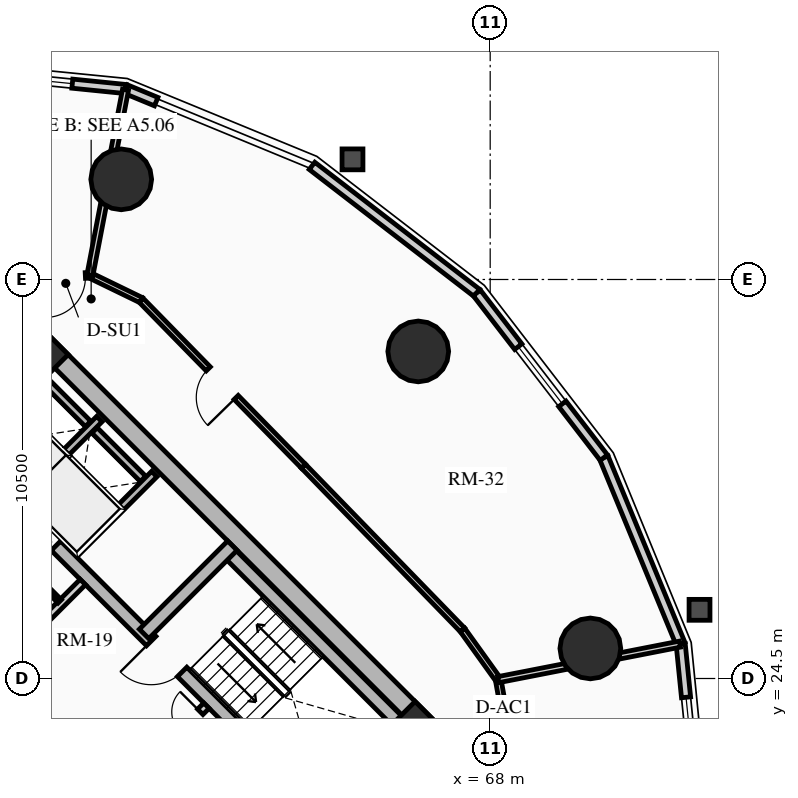
"""IFC4 building model, lengths in metres.
Left out: names, types, materials, properties, quantities, classifications, styles, units other than length and angle.
Written with IfcOpenShell. Run it as: python <this file> out.ifc"""

import sys

from ifc_helpers import new_model, si_unit, direction, frame, frame_2d, origin, origin_2d, place, context, subcontext, project, spatial, rectangle, circle, extrude, source, transform, mapped, element, fill, save


model = new_model("IFC4")
c1 = context("Model", 3, precision=1e-05, world=origin(), true_north=direction((0.0, 1.0)))
c2 = subcontext(c1, "Body", "Model", "MODEL_VIEW")
j1 = project(units=[si_unit("LENGTHUNIT", "METRE"), si_unit("PLANEANGLEUNIT", "RADIAN")], contexts=[c1])
p1 = place(None, origin())
s1 = spatial("IfcSite", under=j1, at=p1, CompositionType="ELEMENT")
p2 = place(p1, origin())
s2 = spatial("IfcBuilding", under=s1, at=p2, CompositionType="ELEMENT")
p3 = place(p2, frame((0.0, 0.0, 27.82)))
s3 = spatial("IfcBuildingStorey", under=s2, at=p3, CompositionType="ELEMENT", Elevation=27.82)
for number, where, z_axis, x_axis in (
    (1, (58.773, 15.661, 0.0), (0.0, 0.0, 1.0), (-0.707, 0.707, 0.0)),
    (2, (66.339, 23.227, 0.0), (0.0, 0.0, 1.0), (-0.707, 0.707, 0.0)),
):
    element("IfcWall", number, at=place(p3, frame(where, z_axis=z_axis, x_axis=x_axis)), inside=s3, PredefinedType="SHEAR", context=c2, shape_type="SweptSolid", body=[
        extrude(rectangle(XDim=14.3, YDim=0.5, at=frame_2d((7.15, 0.0))), origin(), (0.0, 0.0, 1.0), 2.91),
    ])
p4 = place(p3, frame((58.596, 15.838, 0.0), z_axis=(0.0, 0.0, 1.0), x_axis=(0.707106781187, 0.707106781187, 0.0)))
e3 = element("IfcWall", 3, at=p4, inside=s3, PredefinedType="SHEAR", context=c2, shape_type="SweptSolid", body=[
    extrude(rectangle(XDim=10.7, YDim=0.5, at=frame_2d((5.35, 0.0))), origin(), (0.0, 0.0, 1.0), 2.91),
])
m1 = source(origin(), c2, "Body", "SweptSolid", [
    extrude(rectangle(XDim=1.5, YDim=2.02, at=frame_2d((0.75, 1.01))), frame((0.0, 0.26, 0.0), z_axis=(0.0, -1.0, 0.0), x_axis=(1.0, 0.0, 0.0)), (0.0, 0.0, 1.0), 0.52),
])
p5 = place(p4, frame((5.45, 0.0, 0.0)))
e4 = element("IfcOpeningElement", 4, at=p5, cuts=e3, PredefinedType="OPENING", context=c2, shape_type="MappedRepresentation", body=[
    mapped(m1, transform((0.0, 0.0, 0.0), x_axis=(1.0, 0.0, 0.0), y_axis=(0.0, 1.0, 0.0), z_axis=(0.0, 0.0, 1.0), scale=1.0)),
])
p6 = place(p3, frame((48.838, 25.596, 0.0), z_axis=(0.0, 0.0, 1.0), x_axis=(0.707106781187, 0.707106781187, 0.0)))
e5 = element("IfcWall", 5, at=p6, inside=s3, PredefinedType="SHEAR", context=c2, shape_type="SweptSolid", body=[
    extrude(rectangle(XDim=10.7, YDim=0.5, at=frame_2d((5.35, 0.0))), origin(), (0.0, 0.0, 1.0), 2.91),
])
p7 = place(p6, frame((4.6, 0.0, 0.0)))
e6 = element("IfcOpeningElement", 6, at=p7, cuts=e5, PredefinedType="OPENING", context=c2, shape_type="MappedRepresentation", body=[
    mapped(m1, transform((0.0, 0.0, 0.0), x_axis=(1.0, 0.0, 0.0), y_axis=(0.0, 1.0, 0.0), z_axis=(0.0, 0.0, 1.0), scale=1.0)),
])
p8 = place(p3, frame((61.096, 18.338, 0.0), z_axis=(0.0, 0.0, 1.0), x_axis=(-0.707106781187, 0.707106781187, 0.0)))
e7 = element("IfcWall", 7, at=p8, inside=s3, PredefinedType="SHEAR", context=c2, shape_type="SweptSolid", body=[
    extrude(rectangle(XDim=13.8, YDim=0.35, at=frame_2d((6.9, 0.0))), origin(), (0.0, 0.0, 1.0), 2.91),
])
m2 = source(origin(), c2, "Body", "SweptSolid", [
    extrude(rectangle(XDim=1.1, YDim=2.015, at=frame_2d((0.55, 1.007))), frame((0.0, 0.185, 0.0), z_axis=(0.0, -1.0, 0.0), x_axis=(1.0, 0.0, 0.0)), (0.0, 0.0, 1.0), 0.37),
])
p9 = place(p8, frame((4.9, 0.0, 0.0)))
e8 = element("IfcOpeningElement", 8, at=p9, cuts=e7, PredefinedType="OPENING", context=c2, shape_type="MappedRepresentation", body=[
    mapped(m2, transform((0.0, 0.0, 0.0), x_axis=(1.0, 0.0, 0.0), y_axis=(0.0, 1.0, 0.0), z_axis=(0.0, 0.0, 1.0), scale=1.0)),
])
m3 = source(origin(), c2, "Body", "SweptSolid", [
    extrude(rectangle(XDim=1.15, YDim=2.02, at=frame_2d((0.575, 1.01))), frame((0.0, 0.185, 0.0), z_axis=(0.0, -1.0, 0.0), x_axis=(1.0, 0.0, 0.0)), (0.0, 0.0, 1.0), 0.37),
])
p10 = place(p8, frame((7.32, 0.0, 0.0)))
e9 = element("IfcOpeningElement", 9, at=p10, cuts=e7, PredefinedType="OPENING", context=c2, shape_type="MappedRepresentation", body=[
    mapped(m3, transform((0.0, 0.0, 0.0), x_axis=(1.0, 0.0, 0.0), y_axis=(0.0, 1.0, 0.0), z_axis=(0.0, 0.0, 1.0), scale=1.0)),
])
p11 = place(p3, frame((63.662, 20.904, 0.0), z_axis=(0.0, 0.0, 1.0), x_axis=(-0.707106781187, 0.707106781187, 0.0)))
e10 = element("IfcWall", 10, at=p11, inside=s3, PredefinedType="SHEAR", context=c2, shape_type="SweptSolid", body=[
    extrude(rectangle(XDim=13.8, YDim=0.35, at=frame_2d((6.9, 0.0))), origin(), (0.0, 0.0, 1.0), 2.91),
])
p12 = place(p11, frame((10.025, 0.0, 0.0)))
e11 = element("IfcOpeningElement", 11, at=p12, cuts=e10, PredefinedType="OPENING", context=c2, shape_type="MappedRepresentation", body=[
    mapped(m2, transform((0.0, 0.0, 0.0), x_axis=(1.0, 0.0, 0.0), y_axis=(0.0, 1.0, 0.0), z_axis=(0.0, 0.0, 1.0), scale=1.0)),
])
p13 = place(p11, frame((12.025, 0.0, 0.0)))
e12 = element("IfcOpeningElement", 12, at=p13, cuts=e10, PredefinedType="OPENING", context=c2, shape_type="MappedRepresentation", body=[
    mapped(m2, transform((0.0, 0.0, 0.0), x_axis=(1.0, 0.0, 0.0), y_axis=(0.0, 1.0, 0.0), z_axis=(0.0, 0.0, 1.0), scale=1.0)),
])
p14 = place(p11, frame((5.33, 0.0, 0.0)))
e13 = element("IfcOpeningElement", 13, at=p14, cuts=e10, PredefinedType="OPENING", context=c2, shape_type="MappedRepresentation", body=[
    mapped(m3, transform((0.0, 0.0, 0.0), x_axis=(1.0, 0.0, 0.0), y_axis=(0.0, 1.0, 0.0), z_axis=(0.0, 0.0, 1.0), scale=1.0)),
])
p15 = place(p3, frame((65.847, 23.089, 0.0), z_axis=(0.0, 0.0, 1.0), x_axis=(-0.707106781187, 0.707106781187, 0.0)))
e14 = element("IfcWall", 14, at=p15, inside=s3, PredefinedType="SHEAR", context=c2, shape_type="SweptSolid", body=[
    extrude(rectangle(XDim=6.745, YDim=0.35, at=frame_2d((3.373, 0.0))), origin(), (0.0, 0.0, 1.0), 2.91),
])
p16 = place(p3, frame((58.893, 25.674, 0.0), z_axis=(0.0, 0.0, 1.0), x_axis=(0.707106781187, 0.707106781187, 0.0)))
e15 = element("IfcWall", 15, at=p16, inside=s3, PredefinedType="SHEAR", context=c2, shape_type="SweptSolid", body=[
    extrude(rectangle(XDim=3.285, YDim=0.35, at=frame_2d((1.643, 0.0))), origin(), (0.0, 0.0, 1.0), 2.91),
])
for number, where, z_axis, x_axis in (
    (16, (66.024, 23.294, 0.0), (0.0, 0.0, 1.0), (0.707, 0.707, 0.0)),
    (17, (56.294, 33.024, 0.0), (0.0, 0.0, 1.0), (0.707, 0.707, 0.0)),
):
    element("IfcColumn", number, at=place(p3, frame(where, z_axis=z_axis, x_axis=x_axis)), inside=s3, PredefinedType="COLUMN", context=c2, shape_type="SweptSolid", body=[
        extrude(rectangle(XDim=0.85, YDim=0.85, at=origin_2d()), origin(), (0.0, 0.0, 1.0), 2.91),
    ])
for number, where, z_axis, x_axis in (
    (18, (66.107, 33.107, 0.0), (0.0, 0.0, 1.0), (1.0, 0.0, 0.0)),
    (19, (58.291, 37.635, 0.0), (0.0, 0.0, 1.0), (1.0, 0.0, 0.0)),
    (20, (70.635, 25.291, 0.0), (0.0, 0.0, 1.0), (1.0, 0.0, 0.0)),
):
    element("IfcColumn", number, at=place(p3, frame(where, z_axis=z_axis, x_axis=x_axis)), inside=s3, PredefinedType="USERDEFINED", context=c2, shape_type="SweptSolid", body=[
        extrude(circle(Radius=0.8, at=origin_2d()), origin(), (0.0, 0.0, 1.0), 2.91),
    ])
p17 = place(p3, frame((63.312, 37.99, 0.0), z_axis=(0.0, 0.0, 1.0), x_axis=(0.791972010801, -0.610557396243, 0.0)))
e21 = element("IfcWall", 21, at=p17, inside=s3, PredefinedType="SOLIDWALL", context=c2, shape_type="SweptSolid", body=[
    extrude(rectangle(XDim=5.475, YDim=0.24, at=frame_2d((2.737, 0.0))), origin(), (0.0, 0.0, 1.0), 2.073),
])
p18 = place(p3, frame((58.407, 40.012, 0.0), z_axis=(0.0, 0.0, 1.0), x_axis=(0.924556017656, -0.381046152345, 0.0)))
e22 = element("IfcWall", 22, at=p18, inside=s3, PredefinedType="SOLIDWALL", context=c2, shape_type="SweptSolid", body=[
    extrude(rectangle(XDim=0.87, YDim=0.24, at=frame_2d((0.435, 0.0))), origin(), (0.0, 0.0, 1.0), 2.635),
])
p19 = place(p3, frame((53.414, 40.516, 0.0), z_axis=(0.0, 0.0, 1.0), x_axis=(0.994951574538, -0.100356187272, 0.0)))
e23 = element("IfcWall", 23, at=p19, inside=s3, PredefinedType="SOLIDWALL", context=c2, shape_type="SweptSolid", body=[
    extrude(rectangle(XDim=5.019, YDim=0.24, at=frame_2d((2.509, 0.0))), origin(), (0.0, 0.0, 1.0), 2.635),
])
m4 = source(origin(), c2, "Body", "SweptSolid", [
    extrude(rectangle(XDim=2.2, YDim=1.35, at=frame_2d((1.1, 0.675))), frame((0.0, 0.13, 0.0), z_axis=(0.0, -1.0, 0.0), x_axis=(1.0, 0.0, 0.0)), (0.0, 0.0, 1.0), 0.26),
])
p20 = place(p19, frame((1.409, 0.0, 0.65)))
e24 = element("IfcOpeningElement", 24, at=p20, cuts=e23, PredefinedType="OPENING", context=c2, shape_type="MappedRepresentation", body=[
    mapped(m4, transform((0.0, 0.0, 0.0), x_axis=(1.0, 0.0, 0.0), y_axis=(0.0, 1.0, 0.0), z_axis=(0.0, 0.0, 1.0), scale=1.0)),
])
p21 = place(p3, frame((73.012, 25.407, 0.0), z_axis=(0.0, 0.0, 1.0), x_axis=(0.100356187272, -0.994951574538, 0.0)))
e25 = element("IfcWall", 25, at=p21, inside=s3, PredefinedType="SOLIDWALL", context=c2, shape_type="SweptSolid", body=[
    extrude(rectangle(XDim=5.019, YDim=0.24, at=frame_2d((2.509, 0.0))), origin(), (0.0, 0.0, 1.0), 2.635),
])
p22 = place(p21, frame((1.409, 0.0, 0.65)))
e26 = element("IfcOpeningElement", 26, at=p22, cuts=e25, PredefinedType="OPENING", context=c2, shape_type="MappedRepresentation", body=[
    mapped(m4, transform((0.0, 0.0, 0.0), x_axis=(1.0, 0.0, 0.0), y_axis=(0.0, 1.0, 0.0), z_axis=(0.0, 0.0, 1.0), scale=1.0)),
])
p23 = place(p3, frame((70.99, 30.312, 0.0), z_axis=(0.0, 0.0, 1.0), x_axis=(0.381113147118, -0.924528403616, 0.0)))
e27 = element("IfcWall", 27, at=p23, inside=s3, PredefinedType="SOLIDWALL", context=c2, shape_type="SweptSolid", body=[
    extrude(rectangle(XDim=5.305, YDim=0.24, at=frame_2d((2.653, 0.0))), origin(), (0.0, 0.0, 1.0), 2.635),
])
p24 = place(p3, frame((67.648, 34.648, 0.0), z_axis=(0.0, 0.0, 1.0), x_axis=(0.610557396243, -0.791972010801, 0.0)))
e28 = element("IfcWall", 28, at=p24, inside=s3, PredefinedType="SOLIDWALL", context=c2, shape_type="SweptSolid", body=[
    extrude(rectangle(XDim=5.475, YDim=0.24, at=frame_2d((2.737, 0.0))), origin(), (0.0, 0.0, 1.0), 2.073),
])
m5 = source(origin(), c2, "Body", "SweptSolid", [
    extrude(rectangle(XDim=1.9, YDim=1.35, at=frame_2d((0.95, 0.675))), frame((0.0, 0.13, 0.0), z_axis=(0.0, -1.0, 0.0), x_axis=(1.0, 0.0, 0.0)), (0.0, 0.0, 1.0), 0.26),
])
p25 = place(p24, frame((1.787, 0.0, 0.65)))
e29 = element("IfcOpeningElement", 29, at=p25, cuts=e28, PredefinedType="OPENING", context=c2, shape_type="MappedRepresentation", body=[
    mapped(m5, transform((0.0, 0.0, 0.0), x_axis=(1.0, 0.0, 0.0), y_axis=(0.0, 1.0, 0.0), z_axis=(0.0, 0.0, 1.0), scale=1.0)),
])
p26 = place(p3, frame((57.062, 27.781, 0.0), z_axis=(0.0, 0.0, 1.0), x_axis=(0.707106781187, 0.707106781187, 0.0)))
e30 = element("IfcWall", 30, at=p26, inside=s3, PredefinedType="SHEAR", context=c2, shape_type="SweptSolid", body=[
    extrude(rectangle(XDim=2.97, YDim=0.2, at=frame_2d((1.485, 0.0))), origin(), (0.0, 0.0, 1.0), 2.91),
])
p27 = place(p3, frame((55.615, 29.227, 0.0), z_axis=(0.0, 0.0, 1.0), x_axis=(0.707147878904, 0.70706568108, 0.0)))
e31 = element("IfcWall", 31, at=p27, inside=s3, PredefinedType="SHEAR", context=c2, shape_type="SweptSolid", body=[
    extrude(rectangle(XDim=2.97, YDim=0.2, at=frame_2d((1.485, 0.0))), origin(), (0.0, 0.0, 1.0), 2.91),
])
p28 = place(p3, frame((58.865, 29.754, 0.0), z_axis=(0.0, 0.0, 1.0), x_axis=(-0.707174411312, 0.707039144592, 0.0)))
e32 = element("IfcWall", 32, at=p28, inside=s3, PredefinedType="SHEAR", context=c2, shape_type="SweptSolid", body=[
    extrude(rectangle(XDim=1.805, YDim=0.2, at=frame_2d((0.902, 0.0))), origin(), (0.0, 0.0, 1.0), 2.91),
])
p29 = place(p3, frame((57.419, 31.2, 0.0), z_axis=(0.0, 0.0, 1.0), x_axis=(-0.707032117043, 0.707181437447, 0.0)))
e33 = element("IfcWall", 33, at=p29, inside=s3, PredefinedType="SHEAR", context=c2, shape_type="SweptSolid", body=[
    extrude(rectangle(XDim=1.635, YDim=0.2, at=frame_2d((0.817, 0.0))), origin(), (0.0, 0.0, 1.0), 2.91),
])
p30 = place(p3, frame((58.214, 21.467, 0.0), z_axis=(0.0, 0.0, 1.0), x_axis=(0.707106781187, 0.707106781187, 0.0)))
e34 = element("IfcWall", 34, at=p30, inside=s3, PredefinedType="PARTITIONING", context=c2, shape_type="SweptSolid", body=[
    extrude(rectangle(XDim=3.28, YDim=0.2, at=frame_2d((1.64, 0.0))), origin(), (0.0, 0.0, 1.0), 2.635),
])
m6 = source(origin(), c2, "Body", "SweptSolid", [
    extrude(rectangle(XDim=1.5, YDim=2.02, at=frame_2d((0.75, 1.01))), frame((0.0, 0.11, 0.0), z_axis=(0.0, -1.0, 0.0), x_axis=(1.0, 0.0, 0.0)), (0.0, 0.0, 1.0), 0.22),
])
p31 = place(p30, frame((1.55, 0.0, 0.0)))
e35 = element("IfcOpeningElement", 35, at=p31, cuts=e34, PredefinedType="OPENING", context=c2, shape_type="MappedRepresentation", body=[
    mapped(m6, transform((0.0, 0.0, 0.0), x_axis=(1.0, 0.0, 0.0), y_axis=(0.0, 1.0, 0.0), z_axis=(0.0, 0.0, 1.0), scale=1.0)),
])
p32 = place(p3, frame((54.961, 24.719, 0.0), z_axis=(0.0, 0.0, 1.0), x_axis=(0.707106781187, 0.707106781187, 0.0)))
e36 = element("IfcWall", 36, at=p32, inside=s3, PredefinedType="PARTITIONING", context=c2, shape_type="SweptSolid", body=[
    extrude(rectangle(XDim=3.28, YDim=0.2, at=frame_2d((1.64, 0.0))), origin(), (0.0, 0.0, 1.0), 2.635),
])
m7 = source(origin(), c2, "Body", "SweptSolid", [
    extrude(rectangle(XDim=0.9, YDim=2.005, at=frame_2d((0.45, 1.002))), frame((0.0, 0.11, 0.0), z_axis=(0.0, -1.0, 0.0), x_axis=(1.0, 0.0, 0.0)), (0.0, 0.0, 1.0), 0.22),
])
p33 = place(p32, frame((0.16, 0.0, 0.0)))
e37 = element("IfcOpeningElement", 37, at=p33, cuts=e36, PredefinedType="OPENING", context=c2, shape_type="MappedRepresentation", body=[
    mapped(m7, transform((0.0, 0.0, 0.0), x_axis=(1.0, 0.0, 0.0), y_axis=(0.0, 1.0, 0.0), z_axis=(0.0, 0.0, 1.0), scale=1.0)),
])
p34 = place(p3, frame((56.673, 26.529, 0.0), z_axis=(0.0, 0.0, 1.0), x_axis=(-0.707052764397, 0.70716079385, 0.0)))
e38 = element("IfcWall", 38, at=p34, inside=s3, PredefinedType="PARTITIONING", context=c2, shape_type="SweptSolid", body=[
    extrude(rectangle(XDim=2.26, YDim=0.125, at=frame_2d((1.13, 0.0))), origin(), (0.0, 0.0, 1.0), 2.635),
])
m8 = source(origin(), c2, "Body", "SweptSolid", [
    extrude(rectangle(XDim=0.9, YDim=2.005, at=frame_2d((0.45, 1.002))), frame((0.0, 0.073, 0.0), z_axis=(0.0, -1.0, 0.0), x_axis=(1.0, 0.0, 0.0)), (0.0, 0.0, 1.0), 0.145),
])
p35 = place(p34, frame((0.65, 0.0, 0.0)))
e39 = element("IfcOpeningElement", 39, at=p35, cuts=e38, PredefinedType="OPENING", context=c2, shape_type="MappedRepresentation", body=[
    mapped(m8, transform((0.0, 0.0, 0.0), x_axis=(1.0, 0.0, 0.0), y_axis=(0.0, 1.0, 0.0), z_axis=(0.0, 0.0, 1.0), scale=1.0)),
])
p36 = place(p3, frame((63.086, 30.086, 0.0), z_axis=(0.0, 0.0, 1.0), x_axis=(-0.699075897379, 0.715047473741, 0.0)))
e40 = element("IfcWall", 40, at=p36, inside=s3, PredefinedType="PARTITIONING", context=c2, shape_type="SweptSolid", body=[
    extrude(rectangle(XDim=6.114, YDim=0.15, at=frame_2d((3.057, 0.0))), origin(), (0.0, 0.0, 1.0), 2.159),
])
m9 = source(origin(), c2, "Body", "SweptSolid", [
    extrude(rectangle(XDim=1.05, YDim=2.015, at=frame_2d((0.525, 1.007))), frame((0.0, 0.085, 0.0), z_axis=(0.0, -1.0, 0.0), x_axis=(1.0, 0.0, 0.0)), (0.0, 0.0, 1.0), 0.17),
])
p37 = place(p36, frame((2.532, 0.0, 0.0)))
e41 = element("IfcOpeningElement", 41, at=p37, cuts=e40, PredefinedType="OPENING", context=c2, shape_type="MappedRepresentation", body=[
    mapped(m9, transform((0.0, 0.0, 0.0), x_axis=(1.0, 0.0, 0.0), y_axis=(0.0, 1.0, 0.0), z_axis=(0.0, 0.0, 1.0), scale=1.0)),
])
p38 = place(p3, frame((58.812, 34.458, 0.0), z_axis=(0.0, 0.0, 1.0), x_axis=(-0.899559490277, 0.436798264021, 0.0)))
e42 = element("IfcWall", 42, at=p38, inside=s3, PredefinedType="PARTITIONING", context=c2, shape_type="SweptSolid", body=[
    extrude(rectangle(XDim=1.495, YDim=0.15, at=frame_2d((0.748, 0.0))), origin(), (0.0, 0.0, 1.0), 2.205),
])
p39 = place(p3, frame((57.467, 35.111, 0.0), z_axis=(0.0, 0.0, 1.0), x_axis=(-0.998691757323, -0.051134859488, 0.0)))
e43 = element("IfcWall", 43, at=p39, inside=s3, PredefinedType="PARTITIONING", context=c2, shape_type="SweptSolid", body=[
    extrude(rectangle(XDim=1.485, YDim=0.15, at=frame_2d((0.742, 0.0))), origin(), (0.0, 0.0, 1.0), 2.159),
])
p40 = place(p39, frame((0.12, 0.0, 0.0)))
e44 = element("IfcOpeningElement", 44, at=p40, cuts=e43, PredefinedType="OPENING", context=c2, shape_type="MappedRepresentation", body=[
    mapped(m9, transform((0.0, 0.0, 0.0), x_axis=(1.0, 0.0, 0.0), y_axis=(0.0, 1.0, 0.0), z_axis=(0.0, 0.0, 1.0), scale=1.0)),
])
p41 = place(p3, frame((68.456, 23.11, 0.0), z_axis=(0.0, 0.0, 1.0), x_axis=(-0.1772522795, 0.984165448191, 0.0)))
e45 = element("IfcWall", 45, at=p41, inside=s3, PredefinedType="PARTITIONING", context=c2, shape_type="SweptSolid", body=[
    extrude(rectangle(XDim=1.382, YDim=0.15, at=frame_2d((0.691, 0.0))), origin(), (0.0, 0.0, 1.0), 2.159),
])
p42 = place(p3, frame((68.211, 24.469, 0.0), z_axis=(0.0, 0.0, 1.0), x_axis=(-0.583012141368, 0.812463441034, 0.0)))
e46 = element("IfcWall", 46, at=p42, inside=s3, PredefinedType="PARTITIONING", context=c2, shape_type="SweptSolid", body=[
    extrude(rectangle(XDim=1.613, YDim=0.15, at=frame_2d((0.807, 0.0))), origin(), (0.0, 0.0, 1.0), 2.205),
])
p43 = place(p3, frame((67.27, 25.78, 0.0), z_axis=(0.0, 0.0, 1.0), x_axis=(-0.696847842907, 0.717218992942, 0.0)))
e47 = element("IfcWall", 47, at=p43, inside=s3, PredefinedType="PARTITIONING", context=c2, shape_type="SweptSolid", body=[
    extrude(rectangle(XDim=6.004, YDim=0.15, at=frame_2d((3.002, 0.0))), origin(), (0.0, 0.0, 1.0), 2.635),
])
p44 = place(p3, frame((57.467, 35.111, 0.0), z_axis=(0.0, 0.0, 1.0), x_axis=(0.188572285328, 0.982059312468, 0.0)))
e48 = element("IfcWall", 48, at=p44, inside=s3, PredefinedType="PARTITIONING", context=c2, shape_type="SweptSolid", body=[
    extrude(rectangle(XDim=4.97, YDim=0.16, at=frame_2d((2.485, 0.0))), origin(), (0.0, 0.0, 1.0), 2.073),
])
p45 = place(p3, frame((68.211, 24.469, 0.0), z_axis=(0.0, 0.0, 1.0), x_axis=(0.981421381452, 0.19186472325, 0.0)))
e49 = element("IfcWall", 49, at=p45, inside=s3, PredefinedType="PARTITIONING", context=c2, shape_type="SweptSolid", body=[
    extrude(rectangle(XDim=4.872, YDim=0.16, at=frame_2d((2.436, 0.0))), origin(), (0.0, 0.0, 1.0), 2.073),
])
m10 = source(origin(), c2, "Body", "SweptSolid", [
    extrude(rectangle(XDim=2.2, YDim=1.35, at=frame_2d((1.1, 0.675))), frame((0.0, 0.03, 0.0), z_axis=(0.0, -1.0, 0.0), x_axis=(1.0, 0.0, 0.0)), (0.0, 0.0, 1.0), 0.06),
])
p46 = place(p20, origin())
e50 = element("IfcWindow", 50, at=p46, inside=s3, PartitioningType="DOUBLE_PANEL_VERTICAL", PredefinedType="WINDOW", context=c2, shape_type="MappedRepresentation", body=[
    mapped(m10, transform((0.0, 0.0, 0.0), x_axis=(1.0, 0.0, 0.0), y_axis=(0.0, 1.0, 0.0), z_axis=(0.0, 0.0, 1.0), scale=1.0)),
])
fill(e24, e50)
p47 = place(p22, origin())
e51 = element("IfcWindow", 51, at=p47, inside=s3, PartitioningType="DOUBLE_PANEL_VERTICAL", PredefinedType="WINDOW", context=c2, shape_type="MappedRepresentation", body=[
    mapped(m10, transform((0.0, 0.0, 0.0), x_axis=(1.0, 0.0, 0.0), y_axis=(0.0, 1.0, 0.0), z_axis=(0.0, 0.0, 1.0), scale=1.0)),
])
fill(e26, e51)
m11 = source(origin(), c2, "Body", "SweptSolid", [
    extrude(rectangle(XDim=1.9, YDim=1.35, at=frame_2d((0.95, 0.675))), frame((0.0, 0.03, 0.0), z_axis=(0.0, -1.0, 0.0), x_axis=(1.0, 0.0, 0.0)), (0.0, 0.0, 1.0), 0.06),
])
p48 = place(p25, origin())
e52 = element("IfcWindow", 52, at=p48, inside=s3, PartitioningType="DOUBLE_PANEL_VERTICAL", PredefinedType="WINDOW", context=c2, shape_type="MappedRepresentation", body=[
    mapped(m11, transform((0.0, 0.0, 0.0), x_axis=(1.0, 0.0, 0.0), y_axis=(0.0, 1.0, 0.0), z_axis=(0.0, 0.0, 1.0), scale=1.0)),
])
fill(e29, e52)
m12 = source(origin(), c2, "Body", "SweptSolid", [
    extrude(rectangle(XDim=1.1, YDim=2.015, at=frame_2d((0.55, 1.007))), frame((0.0, 0.025, 0.0), z_axis=(0.0, -1.0, 0.0), x_axis=(1.0, 0.0, 0.0)), (0.0, 0.0, 1.0), 0.05),
])
p49 = place(p12, origin())
e53 = element("IfcDoor", 53, at=p49, inside=s3, OperationType="SLIDING_TO_RIGHT", PredefinedType="DOOR", context=c2, shape_type="MappedRepresentation", body=[
    mapped(m12, transform((0.0, 0.0, 0.0), x_axis=(1.0, 0.0, 0.0), y_axis=(0.0, 1.0, 0.0), z_axis=(0.0, 0.0, 1.0), scale=1.0)),
])
fill(e11, e53)
m13 = source(origin(), c2, "Body", "SweptSolid", [
    extrude(rectangle(XDim=1.15, YDim=2.02, at=frame_2d((0.575, 1.01))), frame((0.0, 0.025, 0.0), z_axis=(0.0, -1.0, 0.0), x_axis=(1.0, 0.0, 0.0)), (0.0, 0.0, 1.0), 0.05),
])
p50 = place(p14, origin())
e54 = element("IfcDoor", 54, at=p50, inside=s3, OperationType="SINGLE_SWING_RIGHT", PredefinedType="DOOR", context=c2, shape_type="MappedRepresentation", body=[
    mapped(m13, transform((0.0, 0.0, 0.0), x_axis=(1.0, 0.0, 0.0), y_axis=(0.0, 1.0, 0.0), z_axis=(0.0, 0.0, 1.0), scale=1.0)),
])
fill(e13, e54)
m14 = source(origin(), c2, "Body", "SweptSolid", [
    extrude(rectangle(XDim=1.5, YDim=2.02, at=frame_2d((0.75, 1.01))), frame((0.0, 0.025, 0.0), z_axis=(0.0, -1.0, 0.0), x_axis=(1.0, 0.0, 0.0)), (0.0, 0.0, 1.0), 0.05),
])
p51 = place(p31, origin())
e55 = element("IfcDoor", 55, at=p51, inside=s3, OperationType="DOUBLE_DOOR_SINGLE_SWING", PredefinedType="DOOR", context=c2, shape_type="MappedRepresentation", body=[
    mapped(m14, transform((0.0, 0.0, 0.0), x_axis=(1.0, 0.0, 0.0), y_axis=(0.0, 1.0, 0.0), z_axis=(0.0, 0.0, 1.0), scale=1.0)),
])
fill(e35, e55)
m15 = source(origin(), c2, "Body", "SweptSolid", [
    extrude(rectangle(XDim=1.05, YDim=2.015, at=frame_2d((0.525, 1.007))), frame((0.0, 0.025, 0.0), z_axis=(0.0, -1.0, 0.0), x_axis=(1.0, 0.0, 0.0)), (0.0, 0.0, 1.0), 0.05),
])
p52 = place(p40, origin())
e56 = element("IfcDoor", 56, at=p52, inside=s3, OperationType="SINGLE_SWING_RIGHT", PredefinedType="DOOR", context=c2, shape_type="MappedRepresentation", body=[
    mapped(m15, transform((0.0, 0.0, 0.0), x_axis=(1.0, 0.0, 0.0), y_axis=(0.0, 1.0, 0.0), z_axis=(0.0, 0.0, 1.0), scale=1.0)),
])
fill(e44, e56)
p53 = place(p37, origin())
e57 = element("IfcDoor", 57, at=p53, inside=s3, OperationType="SINGLE_SWING_LEFT", PredefinedType="DOOR", context=c2, shape_type="MappedRepresentation", body=[
    mapped(m15, transform((0.0, 0.0, 0.0), x_axis=(1.0, 0.0, 0.0), y_axis=(0.0, 1.0, 0.0), z_axis=(0.0, 0.0, 1.0), scale=1.0)),
])
fill(e41, e57)
save(model, sys.argv[1])
